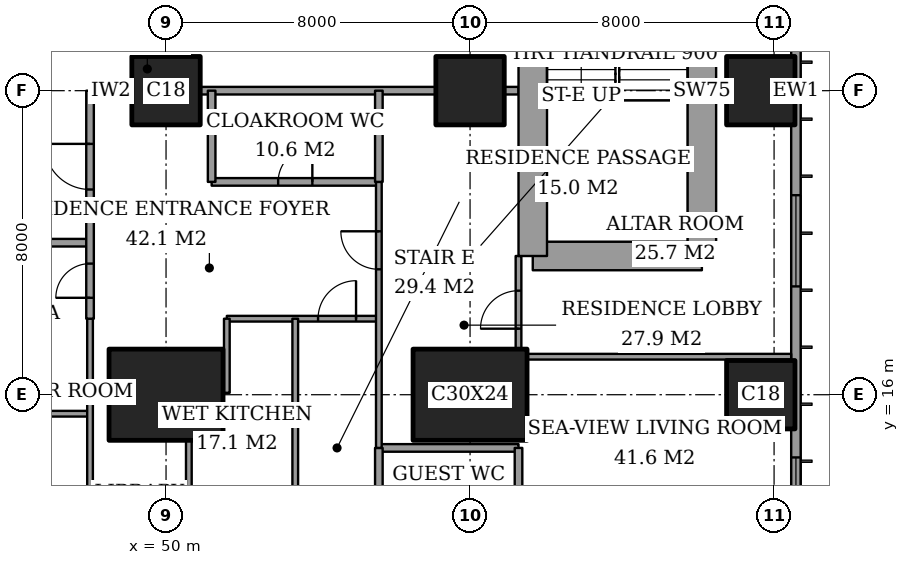
"""IFC4 building model, lengths in metres.
Left out: names, types, materials, properties, quantities, classifications, styles, units other than length and angle.
Written with IfcOpenShell. Run it as: python <this file> out.ifc"""

import sys

from ifc_helpers import new_model, si_unit, direction, frame, frame_2d, origin, origin_2d, place, context, subcontext, project, spatial, rectangle, extrude, element, fill, save


model = new_model("IFC4")
c1 = context("Model", 3, precision=1e-05, world=origin(), true_north=direction((0.0, 1.0)))
c2 = subcontext(c1, "Body", "Model", "MODEL_VIEW")
j1 = project(units=[si_unit("LENGTHUNIT", "METRE"), si_unit("PLANEANGLEUNIT", "RADIAN")], contexts=[c1])
p1 = place(None, origin())
s1 = spatial("IfcSite", under=j1, at=p1, CompositionType="ELEMENT")
p2 = place(p1, origin())
s2 = spatial("IfcBuilding", under=s1, at=p2, CompositionType="ELEMENT")
p3 = place(p2, frame((0.0, 0.0, 182.2)))
s3 = spatial("IfcBuildingStorey", under=s2, at=p3, CompositionType="ELEMENT", Elevation=182.2)
p4 = place(p3, frame((50.0, 16.0, 0.0), z_axis=(0.0, 0.0, 1.0), x_axis=(1.0, 0.0, 0.0)))
e1 = element("IfcColumn", 1, at=p4, inside=s3, PredefinedType="COLUMN", context=c2, shape_type="SweptSolid", body=[
    extrude(rectangle(XDim=3.0, YDim=2.4, at=origin_2d()), origin(), (0.0, 0.0, 1.0), 3.6),
])
p5 = place(p3, frame((50.0, 24.0, 0.0), z_axis=(0.0, 0.0, 1.0), x_axis=(1.0, 0.0, 0.0)))
e2 = element("IfcColumn", 2, at=p5, inside=s3, PredefinedType="COLUMN", context=c2, shape_type="SweptSolid", body=[
    extrude(rectangle(XDim=1.8, YDim=1.8, at=origin_2d()), origin(), (0.0, 0.0, 1.0), 3.6),
])
p6 = place(p3, frame((58.0, 16.0, 0.0), z_axis=(0.0, 0.0, 1.0), x_axis=(1.0, 0.0, 0.0)))
e3 = element("IfcColumn", 3, at=p6, inside=s3, PredefinedType="COLUMN", context=c2, shape_type="SweptSolid", body=[
    extrude(rectangle(XDim=3.0, YDim=2.4, at=origin_2d()), origin(), (0.0, 0.0, 1.0), 3.6),
])
for number, where, z_axis, x_axis in (
    (4, (58.0, 24.0, 0.0), (0.0, 0.0, 1.0), (1.0, 0.0, 0.0)),
    (5, (65.65, 16.0, 0.0), (0.0, 0.0, 1.0), (1.0, 0.0, 0.0)),
    (6, (65.65, 24.0, 0.0), (0.0, 0.0, 1.0), (1.0, 0.0, 0.0)),
):
    element("IfcColumn", number, at=place(p3, frame(where, z_axis=z_axis, x_axis=x_axis)), inside=s3, PredefinedType="COLUMN", context=c2, shape_type="SweptSolid", body=[
        extrude(rectangle(XDim=1.8, YDim=1.8, at=origin_2d()), origin(), (0.0, 0.0, 1.0), 3.6),
    ])
p7 = place(p3, frame((59.65, 19.65, 0.0), z_axis=(0.0, 0.0, 1.0), x_axis=(1.0, 0.0, 0.0)))
e7 = element("IfcWall", 7, at=p7, inside=s3, PredefinedType="SHEAR", context=c2, shape_type="SweptSolid", body=[
    extrude(rectangle(XDim=4.45, YDim=0.75, at=frame_2d((2.225, 0.0))), origin(), (0.0, 0.0, 1.0), 3.6),
])
p8 = place(p3, frame((64.1, 19.65, 0.0), z_axis=(0.0, 0.0, 1.0), x_axis=(0.0, 1.0, 0.0)))
e8 = element("IfcWall", 8, at=p8, inside=s3, PredefinedType="SHEAR", context=c2, shape_type="SweptSolid", body=[
    extrude(rectangle(XDim=8.7, YDim=0.75, at=frame_2d((4.35, 0.0))), origin(), (0.0, 0.0, 1.0), 3.6),
])
p9 = place(p3, frame((59.65, 28.35, 0.0), z_axis=(0.0, 0.0, 1.0), x_axis=(0.0, -1.0, 0.0)))
e9 = element("IfcWall", 9, at=p9, inside=s3, PredefinedType="SHEAR", context=c2, shape_type="SweptSolid", body=[
    extrude(rectangle(XDim=8.7, YDim=0.75, at=frame_2d((4.35, 0.0))), origin(), (0.0, 0.0, 1.0), 3.6),
])
p10 = place(p9, frame((0.975, 0.0, 0.0)))
e10 = element("IfcOpeningElement", 10, at=p10, cuts=e9, PredefinedType="OPENING", context=c2, shape_type="SweptSolid", body=[
    extrude(rectangle(XDim=1.0, YDim=2.1, at=frame_2d((0.5, 1.05))), frame((0.0, 0.385, 0.0), z_axis=(0.0, -1.0, 0.0), x_axis=(1.0, 0.0, 0.0)), (0.0, 0.0, 1.0), 0.77),
])
p11 = place(p3, frame((66.575, 3.175, 0.0), z_axis=(0.0, 0.0, 1.0), x_axis=(0.0, 1.0, 0.0)))
e11 = element("IfcWall", 11, at=p11, inside=s3, PredefinedType="SOLIDWALL", context=c2, shape_type="SweptSolid", body=[
    extrude(rectangle(XDim=41.65, YDim=0.25, at=frame_2d((20.825, 0.0))), origin(), (0.0, 0.0, 1.0), 3.6),
])
p12 = place(p11, frame((0.825, 0.0, 0.2)))
e12 = element("IfcOpeningElement", 12, at=p12, cuts=e11, PredefinedType="OPENING", context=c2, shape_type="SweptSolid", body=[
    extrude(rectangle(XDim=2.4, YDim=2.4, at=frame_2d((1.2, 1.2))), frame((0.0, 0.135, 0.0), z_axis=(0.0, -1.0, 0.0), x_axis=(1.0, 0.0, 0.0)), (0.0, 0.0, 1.0), 0.27),
])
p13 = place(p11, frame((6.6, 0.0, 0.2)))
e13 = element("IfcOpeningElement", 13, at=p13, cuts=e11, PredefinedType="OPENING", context=c2, shape_type="SweptSolid", body=[
    extrude(rectangle(XDim=1.2, YDim=2.4, at=frame_2d((0.6, 1.2))), frame((0.0, 0.135, 0.0), z_axis=(0.0, -1.0, 0.0), x_axis=(1.0, 0.0, 0.0)), (0.0, 0.0, 1.0), 0.27),
])
p14 = place(p11, frame((8.775, 0.0, 0.2)))
e14 = element("IfcOpeningElement", 14, at=p14, cuts=e11, PredefinedType="OPENING", context=c2, shape_type="SweptSolid", body=[
    extrude(rectangle(XDim=2.4, YDim=2.4, at=frame_2d((1.2, 1.2))), frame((0.0, 0.135, 0.0), z_axis=(0.0, -1.0, 0.0), x_axis=(1.0, 0.0, 0.0)), (0.0, 0.0, 1.0), 0.27),
])
p15 = place(p11, frame((15.675, 0.0, 0.2)))
e15 = element("IfcOpeningElement", 15, at=p15, cuts=e11, PredefinedType="OPENING", context=c2, shape_type="SweptSolid", body=[
    extrude(rectangle(XDim=2.4, YDim=2.4, at=frame_2d((1.2, 1.2))), frame((0.0, 0.135, 0.0), z_axis=(0.0, -1.0, 0.0), x_axis=(1.0, 0.0, 0.0)), (0.0, 0.0, 1.0), 0.27),
])
p16 = place(p11, frame((23.575, 0.0, 0.2)))
e16 = element("IfcOpeningElement", 16, at=p16, cuts=e11, PredefinedType="OPENING", context=c2, shape_type="SweptSolid", body=[
    extrude(rectangle(XDim=2.4, YDim=2.4, at=frame_2d((1.2, 1.2))), frame((0.0, 0.135, 0.0), z_axis=(0.0, -1.0, 0.0), x_axis=(1.0, 0.0, 0.0)), (0.0, 0.0, 1.0), 0.27),
])
p17 = place(p11, frame((30.775, 0.0, 0.2)))
e17 = element("IfcOpeningElement", 17, at=p17, cuts=e11, PredefinedType="OPENING", context=c2, shape_type="SweptSolid", body=[
    extrude(rectangle(XDim=2.4, YDim=2.4, at=frame_2d((1.2, 1.2))), frame((0.0, 0.135, 0.0), z_axis=(0.0, -1.0, 0.0), x_axis=(1.0, 0.0, 0.0)), (0.0, 0.0, 1.0), 0.27),
])
p18 = place(p11, frame((34.55, 0.0, 0.2)))
e18 = element("IfcOpeningElement", 18, at=p18, cuts=e11, PredefinedType="OPENING", context=c2, shape_type="SweptSolid", body=[
    extrude(rectangle(XDim=1.2, YDim=2.4, at=frame_2d((0.6, 1.2))), frame((0.0, 0.135, 0.0), z_axis=(0.0, -1.0, 0.0), x_axis=(1.0, 0.0, 0.0)), (0.0, 0.0, 1.0), 0.27),
])
p19 = place(p11, frame((38.425, 0.0, 0.2)))
e19 = element("IfcOpeningElement", 19, at=p19, cuts=e11, PredefinedType="OPENING", context=c2, shape_type="SweptSolid", body=[
    extrude(rectangle(XDim=2.4, YDim=2.4, at=frame_2d((1.2, 1.2))), frame((0.0, 0.135, 0.0), z_axis=(0.0, -1.0, 0.0), x_axis=(1.0, 0.0, 0.0)), (0.0, 0.0, 1.0), 0.27),
])
p20 = place(p3, frame((55.6, 14.6, 0.0), z_axis=(0.0, 0.0, 1.0), x_axis=(1.0, 0.0, 0.0)))
e20 = element("IfcWall", 20, at=p20, inside=s3, PredefinedType="PARTITIONING", context=c2, shape_type="SweptSolid", body=[
    extrude(rectangle(XDim=3.675, YDim=0.2, at=frame_2d((1.837, 0.0))), origin(), (0.0, 0.0, 1.0), 3.35),
])
p21 = place(p3, frame((42.0, 15.5, 0.0), z_axis=(0.0, 0.0, 1.0), x_axis=(1.0, 0.0, 0.0)))
e21 = element("IfcWall", 21, at=p21, inside=s3, PredefinedType="PARTITIONING", context=c2, shape_type="SweptSolid", body=[
    extrude(rectangle(XDim=6.0, YDim=0.15, at=frame_2d((3.0, 0.0))), origin(), (0.0, 0.0, 1.0), 3.35),
])
p22 = place(p3, frame((48.0, 16.05, 0.0), z_axis=(0.0, 0.0, 1.0), x_axis=(1.0, 0.0, 0.0)))
e22 = element("IfcWall", 22, at=p22, inside=s3, PredefinedType="PARTITIONING", context=c2, shape_type="SweptSolid", body=[
    extrude(rectangle(XDim=0.5, YDim=0.15, at=frame_2d((0.25, 0.0))), origin(), (0.0, 0.0, 1.0), 2.634),
])
p23 = place(p3, frame((59.5, 17.0, 0.0), z_axis=(0.0, 0.0, 1.0), x_axis=(1.0, 0.0, 0.0)))
e23 = element("IfcWall", 23, at=p23, inside=s3, PredefinedType="PARTITIONING", context=c2, shape_type="SweptSolid", body=[
    extrude(rectangle(XDim=6.95, YDim=0.15, at=frame_2d((3.475, 0.0))), origin(), (0.0, 0.0, 1.0), 3.35),
])
p24 = place(p3, frame((51.6, 18.0, 0.0), z_axis=(0.0, 0.0, 1.0), x_axis=(1.0, 0.0, 0.0)))
e24 = element("IfcWall", 24, at=p24, inside=s3, PredefinedType="PARTITIONING", context=c2, shape_type="SweptSolid", body=[
    extrude(rectangle(XDim=4.0, YDim=0.15, at=frame_2d((2.0, 0.0))), origin(), (0.0, 0.0, 1.0), 3.35),
])
p25 = place(p24, frame((2.4, 0.0, 0.0)))
e25 = element("IfcOpeningElement", 25, at=p25, cuts=e24, PredefinedType="OPENING", context=c2, shape_type="SweptSolid", body=[
    extrude(rectangle(XDim=1.0, YDim=2.1, at=frame_2d((0.5, 1.05))), frame((0.0, 0.085, 0.0), z_axis=(0.0, -1.0, 0.0), x_axis=(1.0, 0.0, 0.0)), (0.0, 0.0, 1.0), 0.17),
])
p26 = place(p3, frame((42.0, 20.0, 0.0), z_axis=(0.0, 0.0, 1.0), x_axis=(1.0, 0.0, 0.0)))
e26 = element("IfcWall", 26, at=p26, inside=s3, PredefinedType="PARTITIONING", context=c2, shape_type="SweptSolid", body=[
    extrude(rectangle(XDim=6.0, YDim=0.2, at=frame_2d((3.0, 0.0))), origin(), (0.0, 0.0, 1.0), 3.35),
])
p27 = place(p3, frame((51.2, 21.6, 0.0), z_axis=(0.0, 0.0, 1.0), x_axis=(1.0, 0.0, 0.0)))
e27 = element("IfcWall", 27, at=p27, inside=s3, PredefinedType="PARTITIONING", context=c2, shape_type="SweptSolid", body=[
    extrude(rectangle(XDim=4.4, YDim=0.2, at=frame_2d((2.2, 0.0))), origin(), (0.0, 0.0, 1.0), 3.35),
])
p28 = place(p27, frame((1.75, 0.0, 0.0)))
e28 = element("IfcOpeningElement", 28, at=p28, cuts=e27, PredefinedType="OPENING", context=c2, shape_type="SweptSolid", body=[
    extrude(rectangle(XDim=0.9, YDim=2.1, at=frame_2d((0.45, 1.05))), frame((0.0, 0.11, 0.0), z_axis=(0.0, -1.0, 0.0), x_axis=(1.0, 0.0, 0.0)), (0.0, 0.0, 1.0), 0.22),
])
p29 = place(p3, frame((48.0, 24.0, 0.0), z_axis=(0.0, 0.0, 1.0), x_axis=(1.0, 0.0, 0.0)))
e29 = element("IfcWall", 29, at=p29, inside=s3, PredefinedType="PARTITIONING", context=c2, shape_type="SweptSolid", body=[
    extrude(rectangle(XDim=1.1, YDim=0.2, at=frame_2d((0.55, 0.0))), origin(), (0.0, 0.0, 1.0), 3.35),
])
p30 = place(p3, frame((50.9, 24.0, 0.0), z_axis=(0.0, 0.0, 1.0), x_axis=(1.0, 0.0, 0.0)))
e30 = element("IfcWall", 30, at=p30, inside=s3, PredefinedType="PARTITIONING", context=c2, shape_type="SweptSolid", body=[
    extrude(rectangle(XDim=6.2, YDim=0.2, at=frame_2d((3.1, 0.0))), origin(), (0.0, 0.0, 1.0), 3.35),
])
p31 = place(p3, frame((58.9, 24.0, 0.0), z_axis=(0.0, 0.0, 1.0), x_axis=(1.0, 0.0, 0.0)))
e31 = element("IfcWall", 31, at=p31, inside=s3, PredefinedType="PARTITIONING", context=c2, shape_type="SweptSolid", body=[
    extrude(rectangle(XDim=0.375, YDim=0.2, at=frame_2d((0.188, 0.0))), origin(), (0.0, 0.0, 1.0), 3.35),
])
p32 = place(p3, frame((48.0, 18.0, 0.0), z_axis=(0.0, 0.0, 1.0), x_axis=(0.0, 1.0, 0.0)))
e32 = element("IfcWall", 32, at=p32, inside=s3, PredefinedType="PARTITIONING", context=c2, shape_type="SweptSolid", body=[
    extrude(rectangle(XDim=6.0, YDim=0.2, at=frame_2d((3.0, 0.0))), origin(), (0.0, 0.0, 1.0), 3.35),
])
p33 = place(p32, frame((3.4, 0.0, 0.0)))
e33 = element("IfcOpeningElement", 33, at=p33, cuts=e32, PredefinedType="OPENING", context=c2, shape_type="SweptSolid", body=[
    extrude(rectangle(XDim=1.2, YDim=2.4, at=frame_2d((0.6, 1.2))), frame((0.0, 0.11, 0.0), z_axis=(0.0, -1.0, 0.0), x_axis=(1.0, 0.0, 0.0)), (0.0, 0.0, 1.0), 0.22),
])
p34 = place(p32, frame((0.55, 0.0, 0.0)))
e34 = element("IfcOpeningElement", 34, at=p34, cuts=e32, PredefinedType="OPENING", context=c2, shape_type="SweptSolid", body=[
    extrude(rectangle(XDim=0.9, YDim=2.1, at=frame_2d((0.45, 1.05))), frame((0.0, 0.11, 0.0), z_axis=(0.0, -1.0, 0.0), x_axis=(1.0, 0.0, 0.0)), (0.0, 0.0, 1.0), 0.22),
])
p35 = place(p3, frame((48.0, 11.2, 0.0), z_axis=(0.0, 0.0, 1.0), x_axis=(0.0, 1.0, 0.0)))
e35 = element("IfcWall", 35, at=p35, inside=s3, PredefinedType="PARTITIONING", context=c2, shape_type="SweptSolid", body=[
    extrude(rectangle(XDim=6.8, YDim=0.15, at=frame_2d((3.4, 0.0))), origin(), (0.0, 0.0, 1.0), 3.35),
])
p36 = place(p3, frame((50.6, 11.2, 0.0), z_axis=(0.0, 0.0, 1.0), x_axis=(0.0, 1.0, 0.0)))
e36 = element("IfcWall", 36, at=p36, inside=s3, PredefinedType="PARTITIONING", context=c2, shape_type="SweptSolid", body=[
    extrude(rectangle(XDim=3.6, YDim=0.15, at=frame_2d((1.8, 0.0))), origin(), (0.0, 0.0, 1.0), 3.35),
])
p37 = place(p3, frame((51.2, 21.6, 0.0), z_axis=(0.0, 0.0, 1.0), x_axis=(0.0, 1.0, 0.0)))
e37 = element("IfcWall", 37, at=p37, inside=s3, PredefinedType="PARTITIONING", context=c2, shape_type="SweptSolid", body=[
    extrude(rectangle(XDim=2.4, YDim=0.2, at=frame_2d((1.2, 0.0))), origin(), (0.0, 0.0, 1.0), 3.35),
])
p38 = place(p3, frame((51.6, 16.05, 0.0), z_axis=(0.0, 0.0, 1.0), x_axis=(0.0, 1.0, 0.0)))
e38 = element("IfcWall", 38, at=p38, inside=s3, PredefinedType="PARTITIONING", context=c2, shape_type="SweptSolid", body=[
    extrude(rectangle(XDim=1.95, YDim=0.15, at=frame_2d((0.975, 0.0))), origin(), (0.0, 0.0, 1.0), 3.35),
])
p39 = place(p3, frame((53.4, 11.2, 0.0), z_axis=(0.0, 0.0, 1.0), x_axis=(0.0, 1.0, 0.0)))
e39 = element("IfcWall", 39, at=p39, inside=s3, PredefinedType="PARTITIONING", context=c2, shape_type="SweptSolid", body=[
    extrude(rectangle(XDim=6.8, YDim=0.15, at=frame_2d((3.4, 0.0))), origin(), (0.0, 0.0, 1.0), 3.35),
])
p40 = place(p3, frame((55.6, 11.2, 0.0), z_axis=(0.0, 0.0, 1.0), x_axis=(0.0, 1.0, 0.0)))
e40 = element("IfcWall", 40, at=p40, inside=s3, PredefinedType="PARTITIONING", context=c2, shape_type="SweptSolid", body=[
    extrude(rectangle(XDim=3.4, YDim=0.2, at=frame_2d((1.7, 0.0))), origin(), (0.0, 0.0, 1.0), 3.35),
])
p41 = place(p3, frame((55.6, 21.6, 0.0), z_axis=(0.0, 0.0, 1.0), x_axis=(0.0, 1.0, 0.0)))
e41 = element("IfcWall", 41, at=p41, inside=s3, PredefinedType="PARTITIONING", context=c2, shape_type="SweptSolid", body=[
    extrude(rectangle(XDim=2.4, YDim=0.2, at=frame_2d((1.2, 0.0))), origin(), (0.0, 0.0, 1.0), 3.35),
])
p42 = place(p3, frame((55.6, 14.6, 0.0), z_axis=(0.0, 0.0, 1.0), x_axis=(0.0, 1.0, 0.0)))
e42 = element("IfcWall", 42, at=p42, inside=s3, PredefinedType="PARTITIONING", context=c2, shape_type="SweptSolid", body=[
    extrude(rectangle(XDim=7.0, YDim=0.15, at=frame_2d((3.5, 0.0))), origin(), (0.0, 0.0, 1.0), 3.35),
])
p43 = place(p42, frame((4.7, 0.0, 0.0)))
e43 = element("IfcOpeningElement", 43, at=p43, cuts=e42, PredefinedType="OPENING", context=c2, shape_type="SweptSolid", body=[
    extrude(rectangle(XDim=1.0, YDim=2.1, at=frame_2d((0.5, 1.05))), frame((0.0, 0.085, 0.0), z_axis=(0.0, -1.0, 0.0), x_axis=(1.0, 0.0, 0.0)), (0.0, 0.0, 1.0), 0.17),
])
p44 = place(p3, frame((59.275, 11.2, 0.0), z_axis=(0.0, 0.0, 1.0), x_axis=(0.0, 1.0, 0.0)))
e44 = element("IfcWall", 44, at=p44, inside=s3, PredefinedType="PARTITIONING", context=c2, shape_type="SweptSolid", body=[
    extrude(rectangle(XDim=3.4, YDim=0.2, at=frame_2d((1.7, 0.0))), origin(), (0.0, 0.0, 1.0), 3.35),
])
p45 = place(p3, frame((59.275, 17.2, 0.0), z_axis=(0.0, 0.0, 1.0), x_axis=(0.0, 1.0, 0.0)))
e45 = element("IfcWall", 45, at=p45, inside=s3, PredefinedType="PARTITIONING", context=c2, shape_type="SweptSolid", body=[
    extrude(rectangle(XDim=2.45, YDim=0.15, at=frame_2d((1.225, 0.0))), origin(), (0.0, 0.0, 1.0), 3.35),
])
p46 = place(p45, frame((0.538, 0.0, 0.0)))
e46 = element("IfcOpeningElement", 46, at=p46, cuts=e45, PredefinedType="OPENING", context=c2, shape_type="SweptSolid", body=[
    extrude(rectangle(XDim=1.0, YDim=2.1, at=frame_2d((0.5, 1.05))), frame((0.0, 0.085, 0.0), z_axis=(0.0, -1.0, 0.0), x_axis=(1.0, 0.0, 0.0)), (0.0, 0.0, 1.0), 0.17),
])
p47 = place(p14, origin())
e47 = element("IfcWindow", 47, at=p47, inside=s3, PartitioningType="SINGLE_PANEL", PredefinedType="WINDOW", context=c2, shape_type="SweptSolid", body=[
    extrude(rectangle(XDim=2.4, YDim=2.4, at=frame_2d((1.2, 1.2))), frame((0.0, 0.03, 0.0), z_axis=(0.0, -1.0, 0.0), x_axis=(1.0, 0.0, 0.0)), (0.0, 0.0, 1.0), 0.06),
])
fill(e14, e47)
p48 = place(p15, origin())
e48 = element("IfcWindow", 48, at=p48, inside=s3, PartitioningType="SINGLE_PANEL", PredefinedType="WINDOW", context=c2, shape_type="SweptSolid", body=[
    extrude(rectangle(XDim=2.4, YDim=2.4, at=frame_2d((1.2, 1.2))), frame((0.0, 0.03, 0.0), z_axis=(0.0, -1.0, 0.0), x_axis=(1.0, 0.0, 0.0)), (0.0, 0.0, 1.0), 0.06),
])
fill(e15, e48)
p49 = place(p46, origin())
e49 = element("IfcDoor", 49, at=p49, inside=s3, OperationType="SINGLE_SWING_RIGHT", PredefinedType="DOOR", context=c2, shape_type="SweptSolid", body=[
    extrude(rectangle(XDim=1.0, YDim=2.1, at=frame_2d((0.5, 1.05))), frame((0.0, 0.025, 0.0), z_axis=(0.0, -1.0, 0.0), x_axis=(1.0, 0.0, 0.0)), (0.0, 0.0, 1.0), 0.05),
])
fill(e46, e49)
p50 = place(p43, origin())
e50 = element("IfcDoor", 50, at=p50, inside=s3, OperationType="SINGLE_SWING_LEFT", PredefinedType="DOOR", context=c2, shape_type="SweptSolid", body=[
    extrude(rectangle(XDim=1.0, YDim=2.1, at=frame_2d((0.5, 1.05))), frame((0.0, 0.025, 0.0), z_axis=(0.0, -1.0, 0.0), x_axis=(1.0, 0.0, 0.0)), (0.0, 0.0, 1.0), 0.05),
])
fill(e43, e50)
p51 = place(p28, origin())
e51 = element("IfcDoor", 51, at=p51, inside=s3, OperationType="SINGLE_SWING_LEFT", PredefinedType="DOOR", context=c2, shape_type="SweptSolid", body=[
    extrude(rectangle(XDim=0.9, YDim=2.1, at=frame_2d((0.45, 1.05))), frame((0.0, 0.025, 0.0), z_axis=(0.0, -1.0, 0.0), x_axis=(1.0, 0.0, 0.0)), (0.0, 0.0, 1.0), 0.05),
])
fill(e28, e51)
p52 = place(p33, origin())
e52 = element("IfcDoor", 52, at=p52, inside=s3, OperationType="SINGLE_SWING_LEFT", PredefinedType="DOOR", context=c2, shape_type="SweptSolid", body=[
    extrude(rectangle(XDim=1.2, YDim=2.4, at=frame_2d((0.6, 1.2))), frame((0.0, 0.025, 0.0), z_axis=(0.0, -1.0, 0.0), x_axis=(1.0, 0.0, 0.0)), (0.0, 0.0, 1.0), 0.05),
])
fill(e33, e52)
p53 = place(p25, origin())
e53 = element("IfcDoor", 53, at=p53, inside=s3, OperationType="SINGLE_SWING_LEFT", PredefinedType="DOOR", context=c2, shape_type="SweptSolid", body=[
    extrude(rectangle(XDim=1.0, YDim=2.1, at=frame_2d((0.5, 1.05))), frame((0.0, 0.025, 0.0), z_axis=(0.0, -1.0, 0.0), x_axis=(1.0, 0.0, 0.0)), (0.0, 0.0, 1.0), 0.05),
])
fill(e25, e53)
p54 = place(p34, origin())
e54 = element("IfcDoor", 54, at=p54, inside=s3, OperationType="SINGLE_SWING_RIGHT", PredefinedType="DOOR", context=c2, shape_type="SweptSolid", body=[
    extrude(rectangle(XDim=0.9, YDim=2.1, at=frame_2d((0.45, 1.05))), frame((0.0, 0.025, 0.0), z_axis=(0.0, -1.0, 0.0), x_axis=(1.0, 0.0, 0.0)), (0.0, 0.0, 1.0), 0.05),
])
fill(e34, e54)
save(model, sys.argv[1])
